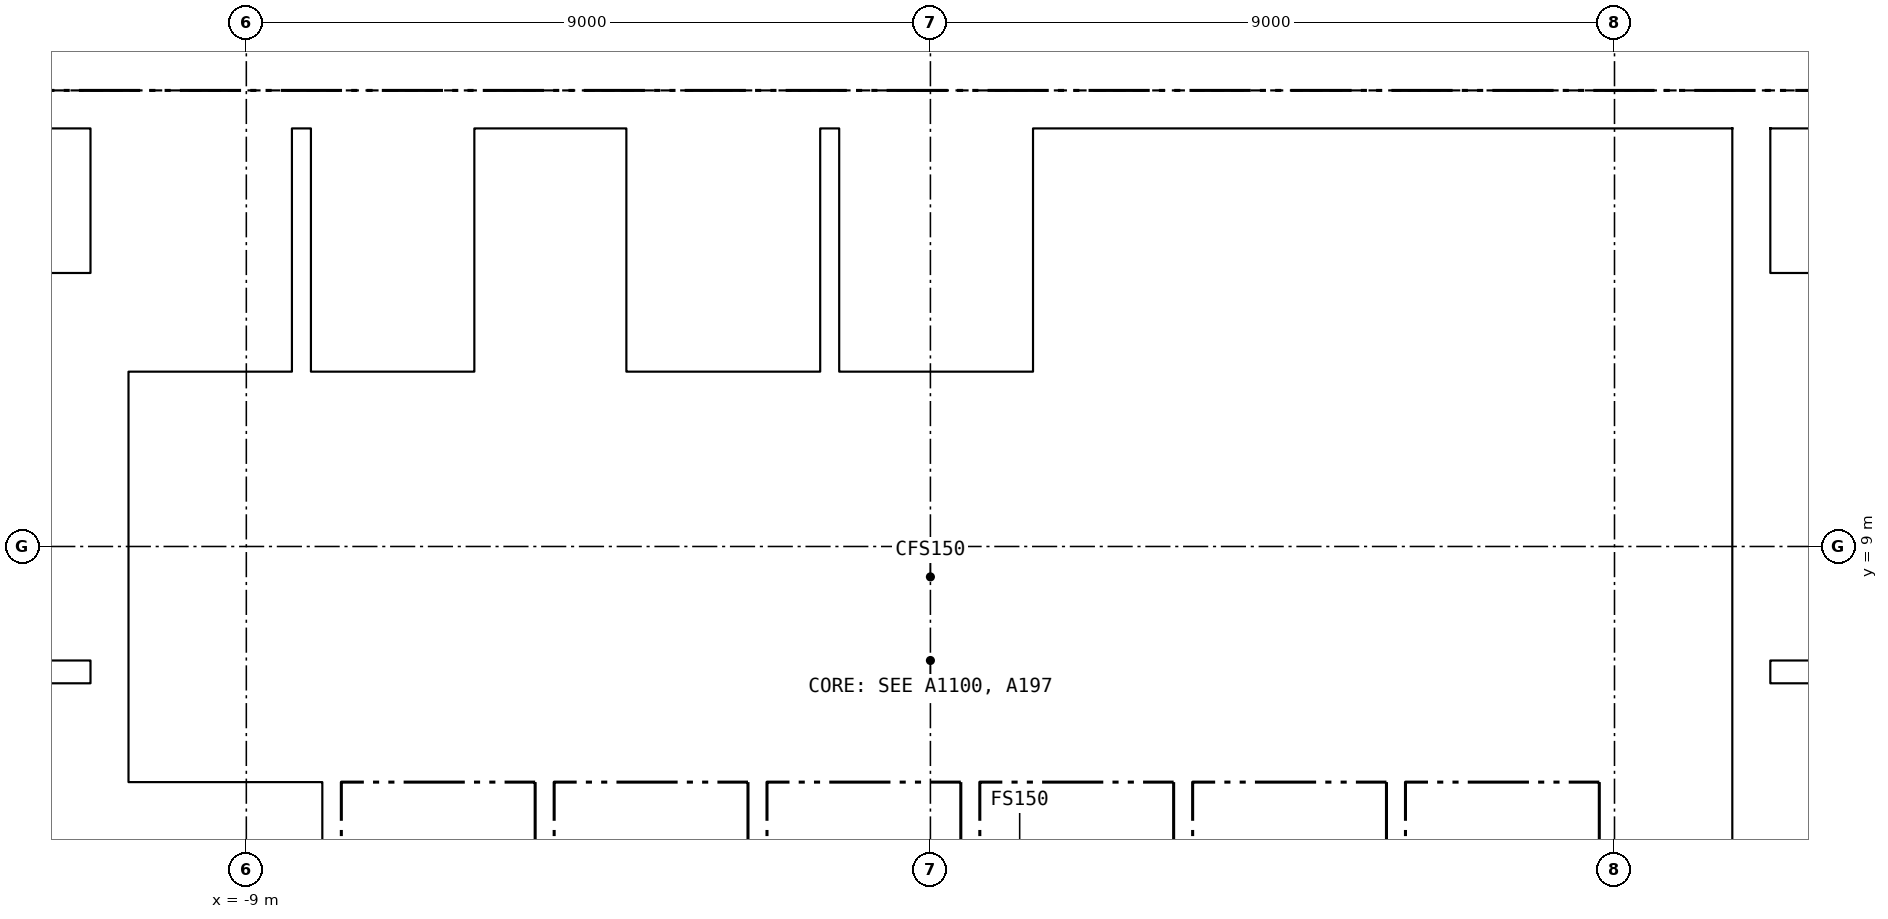
"""IFC4 building model, lengths in metres.
Left out: names, types, materials, properties, quantities, classifications, styles, units other than length and angle.
Written with IfcOpenShell. Run it as: python <this file> out.ifc"""

import sys

from ifc_helpers import new_model, si_unit, direction, frame, frame_2d, origin, place, context, subcontext, project, spatial, rectangle, extrude, element, fill, save


model = new_model("IFC4")
c1 = context("Model", 3, precision=1e-05, world=origin(), true_north=direction((0.0, 1.0)))
c2 = subcontext(c1, "Body", "Model", "MODEL_VIEW")
j1 = project(units=[si_unit("LENGTHUNIT", "METRE"), si_unit("PLANEANGLEUNIT", "RADIAN")], contexts=[c1])
p1 = place(None, origin())
s1 = spatial("IfcSite", under=j1, at=p1, CompositionType="ELEMENT")
p2 = place(p1, origin())
s2 = spatial("IfcBuilding", under=s1, at=p2, CompositionType="ELEMENT")
p3 = place(p2, frame((0.0, 0.0, 293.8)))
s3 = spatial("IfcBuildingStorey", under=s2, at=p3, CompositionType="ELEMENT", Elevation=293.8)
p4 = place(p3, frame((-15.0, 14.75, -0.15), z_axis=(0.0, 0.0, 1.0), x_axis=(1.0, 0.0, 0.0)))
e1 = element("IfcWall", 1, at=p4, inside=s3, PredefinedType="SOLIDWALL", context=c2, shape_type="SweptSolid", body=[
    extrude(rectangle(XDim=30.0, YDim=0.5, at=frame_2d((15.0, 0.0))), origin(), (0.0, 0.0, 1.0), 3.65),
])
p5 = place(p4, frame((9.25, 0.0, 0.15)))
e2 = element("IfcOpeningElement", 2, at=p5, cuts=e1, PredefinedType="OPENING", context=c2, shape_type="SweptSolid", body=[
    extrude(rectangle(XDim=1.5, YDim=2.1, at=frame_2d((0.75, 1.05))), frame((0.0, 0.26, 0.0), z_axis=(0.0, -1.0, 0.0), x_axis=(1.0, 0.0, 0.0)), (0.0, 0.0, 1.0), 0.52),
])
p6 = place(p4, frame((19.4, 0.0, 0.15)))
e3 = element("IfcOpeningElement", 3, at=p6, cuts=e1, PredefinedType="OPENING", context=c2, shape_type="SweptSolid", body=[
    extrude(rectangle(XDim=1.5, YDim=2.1, at=frame_2d((0.75, 1.05))), frame((0.0, 0.26, 0.0), z_axis=(0.0, -1.0, 0.0), x_axis=(1.0, 0.0, 0.0)), (0.0, 0.0, 1.0), 0.52),
])
p7 = place(p4, frame((1.5, 0.0, 0.15)))
e4 = element("IfcOpeningElement", 4, at=p7, cuts=e1, PredefinedType="OPENING", context=c2, shape_type="SweptSolid", body=[
    extrude(rectangle(XDim=1.2, YDim=2.1, at=frame_2d((0.6, 1.05))), frame((0.0, 0.26, 0.0), z_axis=(0.0, -1.0, 0.0), x_axis=(1.0, 0.0, 0.0)), (0.0, 0.0, 1.0), 0.52),
])
p8 = place(p4, frame((27.3, 0.0, 0.15)))
e5 = element("IfcOpeningElement", 5, at=p8, cuts=e1, PredefinedType="OPENING", context=c2, shape_type="SweptSolid", body=[
    extrude(rectangle(XDim=1.2, YDim=2.1, at=frame_2d((0.6, 1.05))), frame((0.0, 0.26, 0.0), z_axis=(0.0, -1.0, 0.0), x_axis=(1.0, 0.0, 0.0)), (0.0, 0.0, 1.0), 0.52),
])
for number, where, z_axis, x_axis in (
    (6, (-10.8, 0.5, -0.15), (0.0, 0.0, 1.0), (0.0, 1.0, 0.0)),
    (7, (10.8, 0.5, -0.15), (0.0, 0.0, 1.0), (0.0, 1.0, 0.0)),
):
    element("IfcWall", number, at=place(p3, frame(where, z_axis=z_axis, x_axis=x_axis)), inside=s3, PredefinedType="SOLIDWALL", context=c2, shape_type="SweptSolid", body=[
        extrude(rectangle(XDim=14.0, YDim=0.5, at=frame_2d((7.0, 0.0))), origin(), (0.0, 0.0, 1.0), 3.65),
    ])
p9 = place(p3, frame((-10.55, 6.025, 0.0), z_axis=(0.0, 0.0, 1.0), x_axis=(1.0, 0.0, 0.0)))
e8 = element("IfcWall", 8, at=p9, inside=s3, PredefinedType="PARTITIONING", context=c2, shape_type="SweptSolid", body=[
    extrude(rectangle(XDim=21.1, YDim=0.25, at=frame_2d((10.55, 0.0))), origin(), (0.0, 0.0, 1.0), 3.5),
])
p10 = place(p3, frame((-4.125, 8.55, 0.0), z_axis=(0.0, 0.0, 1.0), x_axis=(1.0, 0.0, 0.0)))
e9 = element("IfcWall", 9, at=p10, inside=s3, PredefinedType="PARTITIONING", context=c2, shape_type="SweptSolid", body=[
    extrude(rectangle(XDim=14.675, YDim=0.2, at=frame_2d((7.337, 0.0))), origin(), (0.0, 0.0, 1.0), 3.5),
])
p11 = place(p10, frame((2.438, 0.0, 0.0)))
e10 = element("IfcOpeningElement", 10, at=p11, cuts=e9, PredefinedType="OPENING", context=c2, shape_type="SweptSolid", body=[
    extrude(rectangle(XDim=1.0, YDim=2.1, at=frame_2d((0.5, 1.05))), frame((0.0, 0.11, 0.0), z_axis=(0.0, -1.0, 0.0), x_axis=(1.0, 0.0, 0.0)), (0.0, 0.0, 1.0), 0.22),
])
p12 = place(p10, frame((6.775, 0.0, 0.0)))
e11 = element("IfcOpeningElement", 11, at=p12, cuts=e9, PredefinedType="OPENING", context=c2, shape_type="SweptSolid", body=[
    extrude(rectangle(XDim=1.0, YDim=2.1, at=frame_2d((0.5, 1.05))), frame((0.0, 0.11, 0.0), z_axis=(0.0, -1.0, 0.0), x_axis=(1.0, 0.0, 0.0)), (0.0, 0.0, 1.0), 0.22),
])
p13 = place(p10, frame((10.363, 0.0, 0.0)))
e12 = element("IfcOpeningElement", 12, at=p13, cuts=e9, PredefinedType="OPENING", context=c2, shape_type="SweptSolid", body=[
    extrude(rectangle(XDim=1.0, YDim=2.1, at=frame_2d((0.5, 1.05))), frame((0.0, 0.11, 0.0), z_axis=(0.0, -1.0, 0.0), x_axis=(1.0, 0.0, 0.0)), (0.0, 0.0, 1.0), 0.22),
])
p14 = place(p10, frame((13.475, 0.0, 0.0)))
e13 = element("IfcOpeningElement", 13, at=p14, cuts=e9, PredefinedType="OPENING", context=c2, shape_type="SweptSolid", body=[
    extrude(rectangle(XDim=0.9, YDim=2.1, at=frame_2d((0.45, 1.05))), frame((0.0, 0.11, 0.0), z_axis=(0.0, -1.0, 0.0), x_axis=(1.0, 0.0, 0.0)), (0.0, 0.0, 1.0), 0.22),
])
p15 = place(p3, frame((-10.55, 11.2, 0.0), z_axis=(0.0, 0.0, 1.0), x_axis=(1.0, 0.0, 0.0)))
e14 = element("IfcWall", 14, at=p15, inside=s3, PredefinedType="PARTITIONING", context=c2, shape_type="SweptSolid", body=[
    extrude(rectangle(XDim=4.8, YDim=0.2, at=frame_2d((2.4, 0.0))), origin(), (0.0, 0.0, 1.0), 3.5),
])
p16 = place(p15, frame((0.525, 0.0, 0.0)))
e15 = element("IfcOpeningElement", 15, at=p16, cuts=e14, PredefinedType="OPENING", context=c2, shape_type="SweptSolid", body=[
    extrude(rectangle(XDim=1.1, YDim=2.1, at=frame_2d((0.55, 1.05))), frame((0.0, 0.11, 0.0), z_axis=(0.0, -1.0, 0.0), x_axis=(1.0, 0.0, 0.0)), (0.0, 0.0, 1.0), 0.22),
])
p17 = place(p15, frame((2.925, 0.0, 0.0)))
e16 = element("IfcOpeningElement", 16, at=p17, cuts=e14, PredefinedType="OPENING", context=c2, shape_type="SweptSolid", body=[
    extrude(rectangle(XDim=1.1, YDim=2.1, at=frame_2d((0.55, 1.05))), frame((0.0, 0.11, 0.0), z_axis=(0.0, -1.0, 0.0), x_axis=(1.0, 0.0, 0.0)), (0.0, 0.0, 1.0), 0.22),
])
p18 = place(p3, frame((-4.25, 11.2, 0.0), z_axis=(0.0, 0.0, 1.0), x_axis=(1.0, 0.0, 0.0)))
e17 = element("IfcWall", 17, at=p18, inside=s3, PredefinedType="PARTITIONING", context=c2, shape_type="SweptSolid", body=[
    extrude(rectangle(XDim=8.65, YDim=0.2, at=frame_2d((4.325, 0.0))), origin(), (0.0, 0.0, 1.0), 3.5),
])
p19 = place(p18, frame((0.825, 0.0, 0.0)))
e18 = element("IfcOpeningElement", 18, at=p19, cuts=e17, PredefinedType="OPENING", context=c2, shape_type="SweptSolid", body=[
    extrude(rectangle(XDim=1.4, YDim=2.1, at=frame_2d((0.7, 1.05))), frame((0.0, 0.11, 0.0), z_axis=(0.0, -1.0, 0.0), x_axis=(1.0, 0.0, 0.0)), (0.0, 0.0, 1.0), 0.22),
])
p20 = place(p18, frame((3.625, 0.0, 0.0)))
e19 = element("IfcOpeningElement", 19, at=p20, cuts=e17, PredefinedType="OPENING", context=c2, shape_type="SweptSolid", body=[
    extrude(rectangle(XDim=1.4, YDim=2.1, at=frame_2d((0.7, 1.05))), frame((0.0, 0.11, 0.0), z_axis=(0.0, -1.0, 0.0), x_axis=(1.0, 0.0, 0.0)), (0.0, 0.0, 1.0), 0.22),
])
p21 = place(p18, frame((6.625, 0.0, 0.0)))
e20 = element("IfcOpeningElement", 20, at=p21, cuts=e17, PredefinedType="OPENING", context=c2, shape_type="SweptSolid", body=[
    extrude(rectangle(XDim=1.0, YDim=2.1, at=frame_2d((0.5, 1.05))), frame((0.0, 0.11, 0.0), z_axis=(0.0, -1.0, 0.0), x_axis=(1.0, 0.0, 0.0)), (0.0, 0.0, 1.0), 0.22),
])
p22 = place(p3, frame((5.9, 11.2, 0.0), z_axis=(0.0, 0.0, 1.0), x_axis=(1.0, 0.0, 0.0)))
e21 = element("IfcWall", 21, at=p22, inside=s3, PredefinedType="PARTITIONING", context=c2, shape_type="SweptSolid", body=[
    extrude(rectangle(XDim=4.65, YDim=0.2, at=frame_2d((2.325, 0.0))), origin(), (0.0, 0.0, 1.0), 3.5),
])
p23 = place(p22, frame((1.075, 0.0, 0.0)))
e22 = element("IfcOpeningElement", 22, at=p23, cuts=e21, PredefinedType="OPENING", context=c2, shape_type="SweptSolid", body=[
    extrude(rectangle(XDim=0.9, YDim=2.1, at=frame_2d((0.45, 1.05))), frame((0.0, 0.11, 0.0), z_axis=(0.0, -1.0, 0.0), x_axis=(1.0, 0.0, 0.0)), (0.0, 0.0, 1.0), 0.22),
])
p24 = place(p22, frame((3.4, 0.0, 0.0)))
e23 = element("IfcOpeningElement", 23, at=p24, cuts=e21, PredefinedType="OPENING", context=c2, shape_type="SweptSolid", body=[
    extrude(rectangle(XDim=0.9, YDim=2.1, at=frame_2d((0.45, 1.05))), frame((0.0, 0.11, 0.0), z_axis=(0.0, -1.0, 0.0), x_axis=(1.0, 0.0, 0.0)), (0.0, 0.0, 1.0), 0.22),
])
p25 = place(p3, frame((-4.125, 6.15, 0.0), z_axis=(0.0, 0.0, 1.0), x_axis=(0.0, 1.0, 0.0)))
e24 = element("IfcWall", 24, at=p25, inside=s3, PredefinedType="PARTITIONING", context=c2, shape_type="SweptSolid", body=[
    extrude(rectangle(XDim=4.95, YDim=0.25, at=frame_2d((2.475, 0.0))), origin(), (0.0, 0.0, 1.0), 3.5),
])
p26 = place(p25, frame((3.125, 0.0, 0.0)))
e25 = element("IfcOpeningElement", 25, at=p26, cuts=e24, PredefinedType="OPENING", context=c2, shape_type="SweptSolid", body=[
    extrude(rectangle(XDim=1.2, YDim=2.1, at=frame_2d((0.6, 1.05))), frame((0.0, 0.135, 0.0), z_axis=(0.0, -1.0, 0.0), x_axis=(1.0, 0.0, 0.0)), (0.0, 0.0, 1.0), 0.27),
])
for number, where, z_axis, x_axis in (
    (26, (-7.875, 3.6, 0.0), (0.0, 0.0, 1.0), (0.0, 1.0, 0.0)),
    (27, (-5.075, 3.6, 0.0), (0.0, 0.0, 1.0), (0.0, 1.0, 0.0)),
    (28, (-2.275, 3.6, 0.0), (0.0, 0.0, 1.0), (0.0, 1.0, 0.0)),
    (29, (0.525, 3.6, 0.0), (0.0, 0.0, 1.0), (0.0, 1.0, 0.0)),
    (30, (3.325, 3.6, 0.0), (0.0, 0.0, 1.0), (0.0, 1.0, 0.0)),
    (31, (6.125, 3.6, 0.0), (0.0, 0.0, 1.0), (0.0, 1.0, 0.0)),
    (32, (8.925, 3.6, 0.0), (0.0, 0.0, 1.0), (0.0, 1.0, 0.0)),
):
    element("IfcWall", number, at=place(p3, frame(where, z_axis=z_axis, x_axis=x_axis)), inside=s3, PredefinedType="PARTITIONING", context=c2, shape_type="SweptSolid", body=[
        extrude(rectangle(XDim=2.3, YDim=0.25, at=frame_2d((1.15, 0.0))), origin(), (0.0, 0.0, 1.0), 3.5),
    ])
for number, where, z_axis, x_axis in (
    (33, (1.7, 6.15, 0.0), (0.0, 0.0, 1.0), (0.0, 1.0, 0.0)),
    (34, (4.6, 6.15, 0.0), (0.0, 0.0, 1.0), (0.0, 1.0, 0.0)),
):
    element("IfcWall", number, at=place(p3, frame(where, z_axis=z_axis, x_axis=x_axis)), inside=s3, PredefinedType="PARTITIONING", context=c2, shape_type="SweptSolid", body=[
        extrude(rectangle(XDim=2.3, YDim=0.15, at=frame_2d((1.15, 0.0))), origin(), (0.0, 0.0, 1.0), 3.5),
    ])
p27 = place(p3, frame((8.925, 6.15, 0.0), z_axis=(0.0, 0.0, 1.0), x_axis=(0.0, 1.0, 0.0)))
e35 = element("IfcWall", 35, at=p27, inside=s3, PredefinedType="PARTITIONING", context=c2, shape_type="SweptSolid", body=[
    extrude(rectangle(XDim=2.3, YDim=0.25, at=frame_2d((1.15, 0.0))), origin(), (0.0, 0.0, 1.0), 3.5),
])
for number, where, z_axis, x_axis in (
    (36, (-8.275, 11.3, 0.0), (0.0, 0.0, 1.0), (0.0, 1.0, 0.0)),
    (37, (-5.875, 11.3, 0.0), (0.0, 0.0, 1.0), (0.0, 1.0, 0.0)),
    (38, (-4.125, 11.3, 0.0), (0.0, 0.0, 1.0), (0.0, 1.0, 0.0)),
    (39, (-1.325, 11.3, 0.0), (0.0, 0.0, 1.0), (0.0, 1.0, 0.0)),
    (40, (1.475, 11.3, 0.0), (0.0, 0.0, 1.0), (0.0, 1.0, 0.0)),
    (41, (4.275, 11.3, 0.0), (0.0, 0.0, 1.0), (0.0, 1.0, 0.0)),
    (42, (6.025, 11.3, 0.0), (0.0, 0.0, 1.0), (0.0, 1.0, 0.0)),
    (43, (8.825, 11.3, 0.0), (0.0, 0.0, 1.0), (0.0, 1.0, 0.0)),
):
    element("IfcWall", number, at=place(p3, frame(where, z_axis=z_axis, x_axis=x_axis)), inside=s3, PredefinedType="PARTITIONING", context=c2, shape_type="SweptSolid", body=[
        extrude(rectangle(XDim=3.2, YDim=0.25, at=frame_2d((1.6, 0.0))), origin(), (0.0, 0.0, 1.0), 3.5),
    ])
for number, where, z_axis, x_axis in (
    (44, (-14.0, 7.35, 0.0), (0.0, 0.0, 1.0), (1.0, 0.0, 0.0)),
    (45, (11.05, 7.35, 0.0), (0.0, 0.0, 1.0), (1.0, 0.0, 0.0)),
):
    element("IfcWall", number, at=place(p3, frame(where, z_axis=z_axis, x_axis=x_axis)), inside=s3, PredefinedType="SOLIDWALL", context=c2, shape_type="SweptSolid", body=[
        extrude(rectangle(XDim=2.95, YDim=0.3, at=frame_2d((1.475, 0.0))), origin(), (0.0, 0.0, 1.0), 3.5),
    ])
p28 = place(p26, origin())
e46 = element("IfcDoor", 46, at=p28, inside=s3, OperationType="SINGLE_SWING_LEFT", PredefinedType="DOOR", context=c2, shape_type="SweptSolid", body=[
    extrude(rectangle(XDim=1.2, YDim=2.1, at=frame_2d((0.6, 1.05))), frame((0.0, 0.025, 0.0), z_axis=(0.0, -1.0, 0.0), x_axis=(1.0, 0.0, 0.0)), (0.0, 0.0, 1.0), 0.05),
])
fill(e25, e46)
p29 = place(p11, origin())
e47 = element("IfcDoor", 47, at=p29, inside=s3, OperationType="SINGLE_SWING_LEFT", PredefinedType="DOOR", context=c2, shape_type="SweptSolid", body=[
    extrude(rectangle(XDim=1.0, YDim=2.1, at=frame_2d((0.5, 1.05))), frame((0.0, 0.025, 0.0), z_axis=(0.0, -1.0, 0.0), x_axis=(1.0, 0.0, 0.0)), (0.0, 0.0, 1.0), 0.05),
])
fill(e10, e47)
p30 = place(p12, origin())
e48 = element("IfcDoor", 48, at=p30, inside=s3, OperationType="SINGLE_SWING_RIGHT", PredefinedType="DOOR", context=c2, shape_type="SweptSolid", body=[
    extrude(rectangle(XDim=1.0, YDim=2.1, at=frame_2d((0.5, 1.05))), frame((0.0, 0.025, 0.0), z_axis=(0.0, -1.0, 0.0), x_axis=(1.0, 0.0, 0.0)), (0.0, 0.0, 1.0), 0.05),
])
fill(e11, e48)
p31 = place(p13, origin())
e49 = element("IfcDoor", 49, at=p31, inside=s3, OperationType="SINGLE_SWING_LEFT", PredefinedType="DOOR", context=c2, shape_type="SweptSolid", body=[
    extrude(rectangle(XDim=1.0, YDim=2.1, at=frame_2d((0.5, 1.05))), frame((0.0, 0.025, 0.0), z_axis=(0.0, -1.0, 0.0), x_axis=(1.0, 0.0, 0.0)), (0.0, 0.0, 1.0), 0.05),
])
fill(e12, e49)
p32 = place(p14, origin())
e50 = element("IfcDoor", 50, at=p32, inside=s3, OperationType="SINGLE_SWING_RIGHT", PredefinedType="DOOR", context=c2, shape_type="SweptSolid", body=[
    extrude(rectangle(XDim=0.9, YDim=2.1, at=frame_2d((0.45, 1.05))), frame((0.0, 0.025, 0.0), z_axis=(0.0, -1.0, 0.0), x_axis=(1.0, 0.0, 0.0)), (0.0, 0.0, 1.0), 0.05),
])
fill(e13, e50)
p33 = place(p16, origin())
e51 = element("IfcDoor", 51, at=p33, inside=s3, OperationType="DOUBLE_DOOR_SLIDING", PredefinedType="DOOR", context=c2, shape_type="SweptSolid", body=[
    extrude(rectangle(XDim=1.1, YDim=2.1, at=frame_2d((0.55, 1.05))), frame((0.0, 0.025, 0.0), z_axis=(0.0, -1.0, 0.0), x_axis=(1.0, 0.0, 0.0)), (0.0, 0.0, 1.0), 0.05),
])
fill(e15, e51)
p34 = place(p17, origin())
e52 = element("IfcDoor", 52, at=p34, inside=s3, OperationType="DOUBLE_DOOR_SLIDING", PredefinedType="DOOR", context=c2, shape_type="SweptSolid", body=[
    extrude(rectangle(XDim=1.1, YDim=2.1, at=frame_2d((0.55, 1.05))), frame((0.0, 0.025, 0.0), z_axis=(0.0, -1.0, 0.0), x_axis=(1.0, 0.0, 0.0)), (0.0, 0.0, 1.0), 0.05),
])
fill(e16, e52)
p35 = place(p19, origin())
e53 = element("IfcDoor", 53, at=p35, inside=s3, OperationType="DOUBLE_DOOR_SLIDING", PredefinedType="DOOR", context=c2, shape_type="SweptSolid", body=[
    extrude(rectangle(XDim=1.4, YDim=2.1, at=frame_2d((0.7, 1.05))), frame((0.0, 0.025, 0.0), z_axis=(0.0, -1.0, 0.0), x_axis=(1.0, 0.0, 0.0)), (0.0, 0.0, 1.0), 0.05),
])
fill(e18, e53)
p36 = place(p20, origin())
e54 = element("IfcDoor", 54, at=p36, inside=s3, OperationType="DOUBLE_DOOR_SLIDING", PredefinedType="DOOR", context=c2, shape_type="SweptSolid", body=[
    extrude(rectangle(XDim=1.4, YDim=2.1, at=frame_2d((0.7, 1.05))), frame((0.0, 0.025, 0.0), z_axis=(0.0, -1.0, 0.0), x_axis=(1.0, 0.0, 0.0)), (0.0, 0.0, 1.0), 0.05),
])
fill(e19, e54)
p37 = place(p21, origin())
e55 = element("IfcDoor", 55, at=p37, inside=s3, OperationType="SINGLE_SWING_LEFT", PredefinedType="DOOR", context=c2, shape_type="SweptSolid", body=[
    extrude(rectangle(XDim=1.0, YDim=2.1, at=frame_2d((0.5, 1.05))), frame((0.0, 0.025, 0.0), z_axis=(0.0, -1.0, 0.0), x_axis=(1.0, 0.0, 0.0)), (0.0, 0.0, 1.0), 0.05),
])
fill(e20, e55)
p38 = place(p23, origin())
e56 = element("IfcDoor", 56, at=p38, inside=s3, OperationType="SINGLE_SWING_RIGHT", PredefinedType="DOOR", context=c2, shape_type="SweptSolid", body=[
    extrude(rectangle(XDim=0.9, YDim=2.1, at=frame_2d((0.45, 1.05))), frame((0.0, 0.025, 0.0), z_axis=(0.0, -1.0, 0.0), x_axis=(1.0, 0.0, 0.0)), (0.0, 0.0, 1.0), 0.05),
])
fill(e22, e56)
p39 = place(p24, origin())
e57 = element("IfcDoor", 57, at=p39, inside=s3, OperationType="SINGLE_SWING_LEFT", PredefinedType="DOOR", context=c2, shape_type="SweptSolid", body=[
    extrude(rectangle(XDim=0.9, YDim=2.1, at=frame_2d((0.45, 1.05))), frame((0.0, 0.025, 0.0), z_axis=(0.0, -1.0, 0.0), x_axis=(1.0, 0.0, 0.0)), (0.0, 0.0, 1.0), 0.05),
])
fill(e23, e57)
p40 = place(p5, origin())
e58 = element("IfcDoor", 58, at=p40, inside=s3, OperationType="DOUBLE_DOOR_SINGLE_SWING", PredefinedType="DOOR", context=c2, shape_type="SweptSolid", body=[
    extrude(rectangle(XDim=1.5, YDim=2.1, at=frame_2d((0.75, 1.05))), frame((0.0, 0.025, 0.0), z_axis=(0.0, -1.0, 0.0), x_axis=(1.0, 0.0, 0.0)), (0.0, 0.0, 1.0), 0.05),
])
fill(e2, e58)
p41 = place(p6, origin())
e59 = element("IfcDoor", 59, at=p41, inside=s3, OperationType="DOUBLE_DOOR_SINGLE_SWING", PredefinedType="DOOR", context=c2, shape_type="SweptSolid", body=[
    extrude(rectangle(XDim=1.5, YDim=2.1, at=frame_2d((0.75, 1.05))), frame((0.0, 0.025, 0.0), z_axis=(0.0, -1.0, 0.0), x_axis=(1.0, 0.0, 0.0)), (0.0, 0.0, 1.0), 0.05),
])
fill(e3, e59)
save(model, sys.argv[1])
